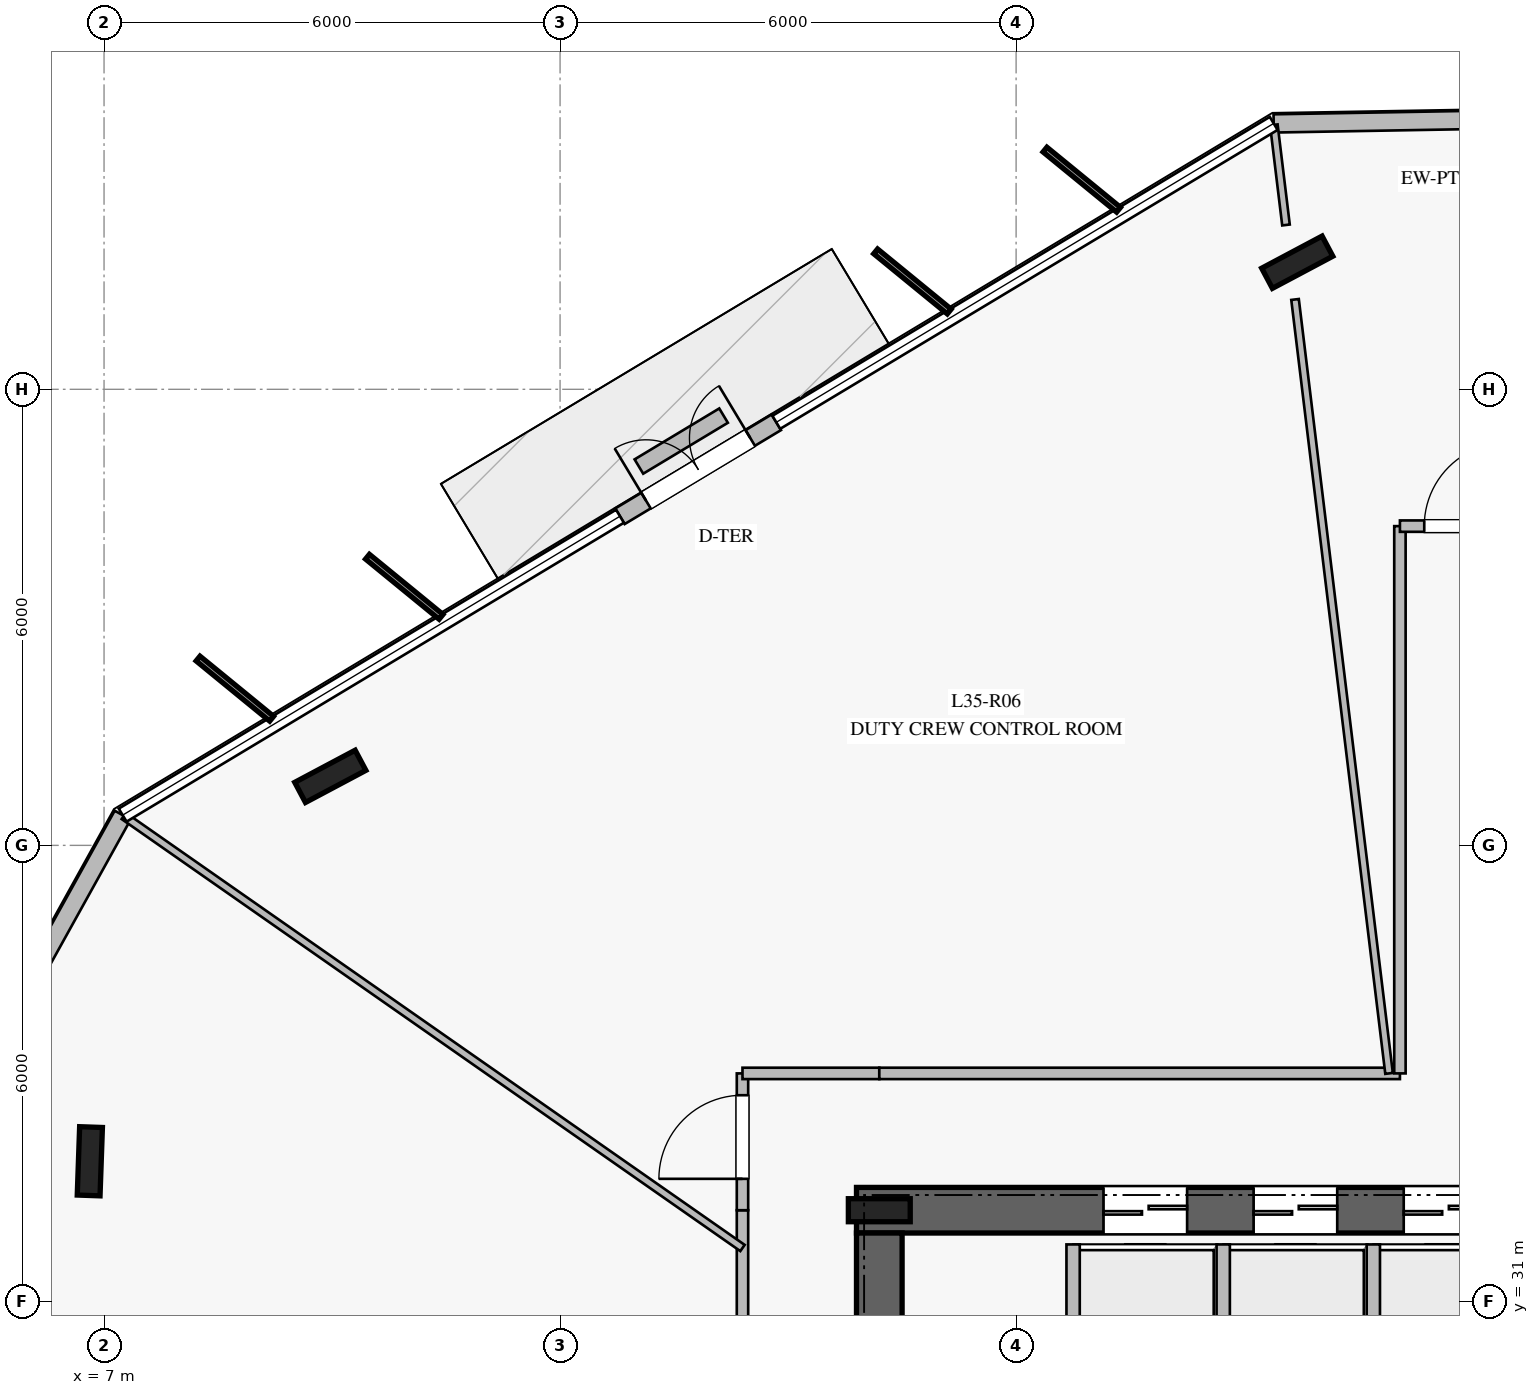
"""IFC4 building model, lengths in metres.
Left out: names, types, materials, properties, quantities, classifications, styles, units other than length and angle.
Written with IfcOpenShell. Run it as: python <this file> out.ifc"""

import sys

from ifc_helpers import new_model, si_unit, direction, frame, frame_2d, origin, origin_2d, place, context, subcontext, project, spatial, rectangle, i_section, extrude, element, fill, save


model = new_model("IFC4")
c1 = context("Model", 3, precision=1e-05, world=origin(), true_north=direction((0.0, 1.0)))
c2 = subcontext(c1, "Body", "Model", "MODEL_VIEW")
j1 = project(units=[si_unit("LENGTHUNIT", "METRE"), si_unit("PLANEANGLEUNIT", "RADIAN")], contexts=[c1])
p1 = place(None, origin())
s1 = spatial("IfcSite", under=j1, at=p1, CompositionType="ELEMENT")
p2 = place(p1, origin())
s2 = spatial("IfcBuilding", under=s1, at=p2, CompositionType="ELEMENT")
p3 = place(p2, frame((0.0, 0.0, 146.4)))
s3 = spatial("IfcBuildingStorey", under=s2, at=p3, CompositionType="ELEMENT", Elevation=146.4)
p4 = place(p3, frame((33.1, 32.2, 0.0), z_axis=(0.0, 0.0, 1.0), x_axis=(-1.0, 0.0, 0.0)))
e1 = element("IfcWall", 1, at=p4, inside=s3, PredefinedType="SHEAR", context=c2, shape_type="SweptSolid", body=[
    extrude(rectangle(XDim=16.2, YDim=0.6, at=frame_2d((8.1, 0.0))), origin(), (0.0, 0.0, 1.0), 3.76),
])
p5 = place(p4, frame((5.05, 0.0, 0.0)))
e2 = element("IfcOpeningElement", 2, at=p5, cuts=e1, PredefinedType="OPENING", context=c2, shape_type="SweptSolid", body=[
    extrude(rectangle(XDim=1.2, YDim=2.25, at=frame_2d((0.6, 1.125))), frame((0.0, 0.31, 0.0), z_axis=(0.0, -1.0, 0.0), x_axis=(1.0, 0.0, 0.0)), (0.0, 0.0, 1.0), 0.62),
])
p6 = place(p4, frame((11.85, 0.0, 0.0)))
e3 = element("IfcOpeningElement", 3, at=p6, cuts=e1, PredefinedType="OPENING", context=c2, shape_type="SweptSolid", body=[
    extrude(rectangle(XDim=1.1, YDim=2.2, at=frame_2d((0.55, 1.1))), frame((0.0, 0.31, 0.0), z_axis=(0.0, -1.0, 0.0), x_axis=(1.0, 0.0, 0.0)), (0.0, 0.0, 1.0), 0.62),
])
p7 = place(p4, frame((9.875, 0.0, 0.0)))
e4 = element("IfcOpeningElement", 4, at=p7, cuts=e1, PredefinedType="OPENING", context=c2, shape_type="SweptSolid", body=[
    extrude(rectangle(XDim=1.1, YDim=2.2, at=frame_2d((0.55, 1.1))), frame((0.0, 0.31, 0.0), z_axis=(0.0, -1.0, 0.0), x_axis=(1.0, 0.0, 0.0)), (0.0, 0.0, 1.0), 0.62),
])
p8 = place(p4, frame((7.9, 0.0, 0.0)))
e5 = element("IfcOpeningElement", 5, at=p8, cuts=e1, PredefinedType="OPENING", context=c2, shape_type="SweptSolid", body=[
    extrude(rectangle(XDim=1.1, YDim=2.2, at=frame_2d((0.55, 1.1))), frame((0.0, 0.31, 0.0), z_axis=(0.0, -1.0, 0.0), x_axis=(1.0, 0.0, 0.0)), (0.0, 0.0, 1.0), 0.62),
])
p9 = place(p3, frame((17.2, 31.9, 0.0), z_axis=(0.0, 0.0, 1.0), x_axis=(0.0, -1.0, 0.0)))
e6 = element("IfcWall", 6, at=p9, inside=s3, PredefinedType="SHEAR", context=c2, shape_type="SweptSolid", body=[
    extrude(rectangle(XDim=13.8, YDim=0.6, at=frame_2d((6.9, 0.0))), origin(), (0.0, 0.0, 1.0), 3.76),
])
p10 = place(p9, frame((2.05, 0.0, 0.0)))
e7 = element("IfcOpeningElement", 7, at=p10, cuts=e6, PredefinedType="OPENING", context=c2, shape_type="SweptSolid", body=[
    extrude(rectangle(XDim=1.5, YDim=2.2, at=frame_2d((0.75, 1.1))), frame((0.0, 0.31, 0.0), z_axis=(0.0, -1.0, 0.0), x_axis=(1.0, 0.0, 0.0)), (0.0, 0.0, 1.0), 0.62),
])
p11 = place(p3, frame((17.2, 32.2, 0.0), z_axis=(0.0, 0.0, 1.0), x_axis=(1.0, 0.0, 0.0)))
e8 = element("IfcColumn", 8, at=p11, inside=s3, PredefinedType="COLUMN", context=c2, shape_type="SweptSolid", body=[
    extrude(i_section(OverallWidth=0.303, OverallDepth=0.814, WebThickness=0.021, FlangeThickness=0.04, at=origin_2d()), origin(), (0.0, 0.0, 1.0), 4.0),
])
for number, where, z_axis, x_axis in (
    (9, (22.699, 44.672, 0.0), (0.0, 0.0, 1.0), (0.883, 0.469, 0.0)),
    (10, (9.977, 37.908, 0.0), (0.0, 0.0, 1.0), (0.883, 0.469, 0.0)),
    (11, (6.813, 32.844, 0.0), (0.0, 0.0, 1.0), (0.035, 0.999, 0.0)),
):
    element("IfcColumn", number, at=place(p3, frame(where, z_axis=z_axis, x_axis=x_axis)), inside=s3, PredefinedType="COLUMN", context=c2, shape_type="SweptSolid", body=[
        extrude(i_section(OverallWidth=0.3, OverallDepth=0.9, WebThickness=0.019, FlangeThickness=0.035, at=origin_2d()), origin(), (0.0, 0.0, 1.0), 4.0),
    ])
p12 = place(p3, frame((26.859, 46.576, 0.0), z_axis=(0.0, 0.0, 1.0), x_axis=(-0.999848251902, -0.017420481313, 0.0)))
e12 = element("IfcWall", 12, at=p12, inside=s3, PredefinedType="STANDARD", context=c2, shape_type="SweptSolid", body=[
    extrude(rectangle(XDim=4.471, YDim=0.24, at=frame_2d((2.235, 0.0))), origin(), (0.0, 0.0, 1.0), 3.76),
])
p13 = place(p3, frame((15.845, 42.566, 0.0), z_axis=(0.0, 0.0, 1.0), x_axis=(-0.857178561762, -0.515019332895, 0.0)))
e13 = element("IfcWall", 13, at=p13, inside=s3, PredefinedType="STANDARD", context=c2, shape_type="SweptSolid", body=[
    extrude(rectangle(XDim=2.4, YDim=0.24, at=frame_2d((1.2, 0.0))), origin(), (0.0, 0.0, 1.0), 3.76),
])
p14 = place(p13, frame((0.4, 0.0, 0.0)))
e14 = element("IfcOpeningElement", 14, at=p14, cuts=e13, PredefinedType="OPENING", context=c2, shape_type="SweptSolid", body=[
    extrude(rectangle(XDim=1.6, YDim=2.25, at=frame_2d((0.8, 1.125))), frame((0.0, 0.13, 0.0), z_axis=(0.0, -1.0, 0.0), x_axis=(1.0, 0.0, 0.0)), (0.0, 0.0, 1.0), 0.26),
])
p15 = place(p3, frame((7.245, 37.398, 0.0), z_axis=(0.0, 0.0, 1.0), x_axis=(-0.484965863304, -0.874533081953, 0.0)))
e15 = element("IfcWall", 15, at=p15, inside=s3, PredefinedType="STANDARD", context=c2, shape_type="SweptSolid", body=[
    extrude(rectangle(XDim=4.471, YDim=0.24, at=frame_2d((2.235, 0.0))), origin(), (0.0, 0.0, 1.0), 3.76),
])
p16 = place(p3, frame((15.151, 42.654, 0.0), z_axis=(0.0, 0.0, 1.0), x_axis=(-0.856845918969, -0.515572566324, 0.0)))
e16 = element("IfcWall", 16, at=p16, inside=s3, PredefinedType="USERDEFINED", context=c2, shape_type="SweptSolid", body=[
    extrude(rectangle(XDim=1.3, YDim=0.22, at=frame_2d((0.65, 0.0))), origin(), (0.0, 0.0, 1.0), 0.4),
])
for number, where, z_axis, x_axis in (
    (17, (19.75, 29.4, 0.0), (0.0, 0.0, 1.0), (0.0, 1.0, 0.0)),
    (18, (21.725, 29.4, 0.0), (0.0, 0.0, 1.0), (0.0, 1.0, 0.0)),
    (19, (23.7, 29.4, 0.0), (0.0, 0.0, 1.0), (0.0, 1.0, 0.0)),
):
    element("IfcWall", number, at=place(p3, frame(where, z_axis=z_axis, x_axis=x_axis)), inside=s3, PredefinedType="PARTITIONING", context=c2, shape_type="SweptSolid", body=[
        extrude(rectangle(XDim=2.35, YDim=0.175, at=frame_2d((1.175, 0.0))), origin(), (0.0, 0.0, 1.0), 3.76),
    ])
p17 = place(p3, frame((15.4, 25.95, 0.0), z_axis=(0.0, 0.0, 1.0), x_axis=(0.0, 1.0, 0.0)))
e20 = element("IfcWall", 20, at=p17, inside=s3, PredefinedType="PARTITIONING", context=c2, shape_type="SweptSolid", body=[
    extrude(rectangle(XDim=6.25, YDim=0.15, at=frame_2d((3.125, 0.0))), origin(), (0.0, 0.0, 1.0), 3.21),
])
p18 = place(p3, frame((15.4, 32.2, 0.0), z_axis=(0.0, 0.0, 1.0), x_axis=(0.0, 1.0, 0.0)))
e21 = element("IfcWall", 21, at=p18, inside=s3, PredefinedType="PARTITIONING", context=c2, shape_type="SweptSolid", body=[
    extrude(rectangle(XDim=1.8, YDim=0.15, at=frame_2d((0.9, 0.0))), origin(), (0.0, 0.0, 1.0), 3.21),
])
p19 = place(p18, frame((0.413, 0.0, 0.0)))
e22 = element("IfcOpeningElement", 22, at=p19, cuts=e21, PredefinedType="OPENING", context=c2, shape_type="SweptSolid", body=[
    extrude(rectangle(XDim=1.1, YDim=2.2, at=frame_2d((0.55, 1.1))), frame((0.0, 0.085, 0.0), z_axis=(0.0, -1.0, 0.0), x_axis=(1.0, 0.0, 0.0)), (0.0, 0.0, 1.0), 0.17),
])
p20 = place(p3, frame((15.4, 34.0, 0.0), z_axis=(0.0, 0.0, 1.0), x_axis=(1.0, 0.0, 0.0)))
e23 = element("IfcWall", 23, at=p20, inside=s3, PredefinedType="PARTITIONING", context=c2, shape_type="SweptSolid", body=[
    extrude(rectangle(XDim=1.8, YDim=0.15, at=frame_2d((0.9, 0.0))), origin(), (0.0, 0.0, 1.0), 3.76),
])
p21 = place(p3, frame((17.2, 34.0, 0.0), z_axis=(0.0, 0.0, 1.0), x_axis=(1.0, 0.0, 0.0)))
e24 = element("IfcWall", 24, at=p21, inside=s3, PredefinedType="PARTITIONING", context=c2, shape_type="SweptSolid", body=[
    extrude(rectangle(XDim=6.85, YDim=0.15, at=frame_2d((3.425, 0.0))), origin(), (0.0, 0.0, 1.0), 3.21),
])
p22 = place(p3, frame((24.05, 34.0, 0.0), z_axis=(0.0, 0.0, 1.0), x_axis=(0.0, 1.0, 0.0)))
e25 = element("IfcWall", 25, at=p22, inside=s3, PredefinedType="PARTITIONING", context=c2, shape_type="SweptSolid", body=[
    extrude(rectangle(XDim=7.2, YDim=0.15, at=frame_2d((3.6, 0.0))), origin(), (0.0, 0.0, 1.0), 3.36),
])
p23 = place(p3, frame((24.05, 41.2, 0.0), z_axis=(0.0, 0.0, 1.0), x_axis=(1.0, 0.0, 0.0)))
e26 = element("IfcWall", 26, at=p23, inside=s3, PredefinedType="PARTITIONING", context=c2, shape_type="SweptSolid", body=[
    extrude(rectangle(XDim=1.9, YDim=0.15, at=frame_2d((0.95, 0.0))), origin(), (0.0, 0.0, 1.0), 3.76),
])
p24 = place(p23, frame((0.32, 0.0, 0.0)))
e27 = element("IfcOpeningElement", 27, at=p24, cuts=e26, PredefinedType="OPENING", context=c2, shape_type="SweptSolid", body=[
    extrude(rectangle(XDim=1.1, YDim=2.2, at=frame_2d((0.55, 1.1))), frame((0.0, 0.085, 0.0), z_axis=(0.0, -1.0, 0.0), x_axis=(1.0, 0.0, 0.0)), (0.0, 0.0, 1.0), 0.17),
])
p25 = place(p3, frame((23.907, 34.0, 0.0), z_axis=(0.0, 0.0, 1.0), x_axis=(-0.120609307466, 0.992700052862, 0.0)))
e28 = element("IfcWall", 28, at=p25, inside=s3, PredefinedType="MOVABLE", context=c2, shape_type="SweptSolid", body=[
    extrude(rectangle(XDim=10.257, YDim=0.1, at=frame_2d((5.128, 0.0))), origin(), (0.0, 0.0, 1.0), 3.21),
])
p26 = place(p3, frame((22.551, 45.162, 0.0), z_axis=(0.0, 0.0, 1.0), x_axis=(-0.120545716325, 0.992707776879, 0.0)))
e29 = element("IfcWall", 29, at=p26, inside=s3, PredefinedType="MOVABLE", context=c2, shape_type="SweptSolid", body=[
    extrude(rectangle(XDim=1.327, YDim=0.1, at=frame_2d((0.663, 0.0))), origin(), (0.0, 0.0, 1.0), 3.76),
])
p27 = place(p3, frame((15.4, 31.703, 0.0), z_axis=(0.0, 0.0, 1.0), x_axis=(-0.819886429215, 0.572526194325, 0.0)))
e30 = element("IfcWall", 30, at=p27, inside=s3, PredefinedType="MOVABLE", context=c2, shape_type="SweptSolid", body=[
    extrude(rectangle(XDim=9.928, YDim=0.1, at=frame_2d((4.964, 0.0))), origin(), (0.0, 0.0, 1.0), 3.16),
])
p28 = place(p14, frame((1.6, 0.0, 0.0), z_axis=(0.0, 0.0, 1.0), x_axis=(-1.0, 0.0, 0.0)))
e31 = element("IfcDoor", 31, at=p28, inside=s3, OperationType="DOUBLE_DOOR_SINGLE_SWING", PredefinedType="DOOR", context=c2, shape_type="SweptSolid", body=[
    extrude(rectangle(XDim=1.6, YDim=2.25, at=frame_2d((0.8, 1.125))), frame((0.0, 0.025, 0.0), z_axis=(0.0, -1.0, 0.0), x_axis=(1.0, 0.0, 0.0)), (0.0, 0.0, 1.0), 0.05),
])
fill(e14, e31)
p29 = place(p6, origin())
e32 = element("IfcDoor", 32, at=p29, inside=s3, OperationType="DOUBLE_DOOR_SLIDING", PredefinedType="DOOR", context=c2, shape_type="SweptSolid", body=[
    extrude(rectangle(XDim=1.1, YDim=2.2, at=frame_2d((0.55, 1.1))), frame((0.0, 0.025, 0.0), z_axis=(0.0, -1.0, 0.0), x_axis=(1.0, 0.0, 0.0)), (0.0, 0.0, 1.0), 0.05),
])
fill(e3, e32)
p30 = place(p7, origin())
e33 = element("IfcDoor", 33, at=p30, inside=s3, OperationType="DOUBLE_DOOR_SLIDING", PredefinedType="DOOR", context=c2, shape_type="SweptSolid", body=[
    extrude(rectangle(XDim=1.1, YDim=2.2, at=frame_2d((0.55, 1.1))), frame((0.0, 0.025, 0.0), z_axis=(0.0, -1.0, 0.0), x_axis=(1.0, 0.0, 0.0)), (0.0, 0.0, 1.0), 0.05),
])
fill(e4, e33)
p31 = place(p8, origin())
e34 = element("IfcDoor", 34, at=p31, inside=s3, OperationType="DOUBLE_DOOR_SLIDING", PredefinedType="DOOR", context=c2, shape_type="SweptSolid", body=[
    extrude(rectangle(XDim=1.1, YDim=2.2, at=frame_2d((0.55, 1.1))), frame((0.0, 0.025, 0.0), z_axis=(0.0, -1.0, 0.0), x_axis=(1.0, 0.0, 0.0)), (0.0, 0.0, 1.0), 0.05),
])
fill(e5, e34)
p32 = place(p24, origin())
e35 = element("IfcDoor", 35, at=p32, inside=s3, OperationType="SINGLE_SWING_RIGHT", PredefinedType="DOOR", context=c2, shape_type="SweptSolid", body=[
    extrude(rectangle(XDim=1.1, YDim=2.2, at=frame_2d((0.55, 1.1))), frame((0.0, 0.025, 0.0), z_axis=(0.0, -1.0, 0.0), x_axis=(1.0, 0.0, 0.0)), (0.0, 0.0, 1.0), 0.05),
])
fill(e27, e35)
p33 = place(p19, origin())
e36 = element("IfcDoor", 36, at=p33, inside=s3, OperationType="SINGLE_SWING_LEFT", PredefinedType="DOOR", context=c2, shape_type="SweptSolid", body=[
    extrude(rectangle(XDim=1.1, YDim=2.2, at=frame_2d((0.55, 1.1))), frame((0.0, 0.025, 0.0), z_axis=(0.0, -1.0, 0.0), x_axis=(1.0, 0.0, 0.0)), (0.0, 0.0, 1.0), 0.05),
])
fill(e22, e36)
save(model, sys.argv[1])
